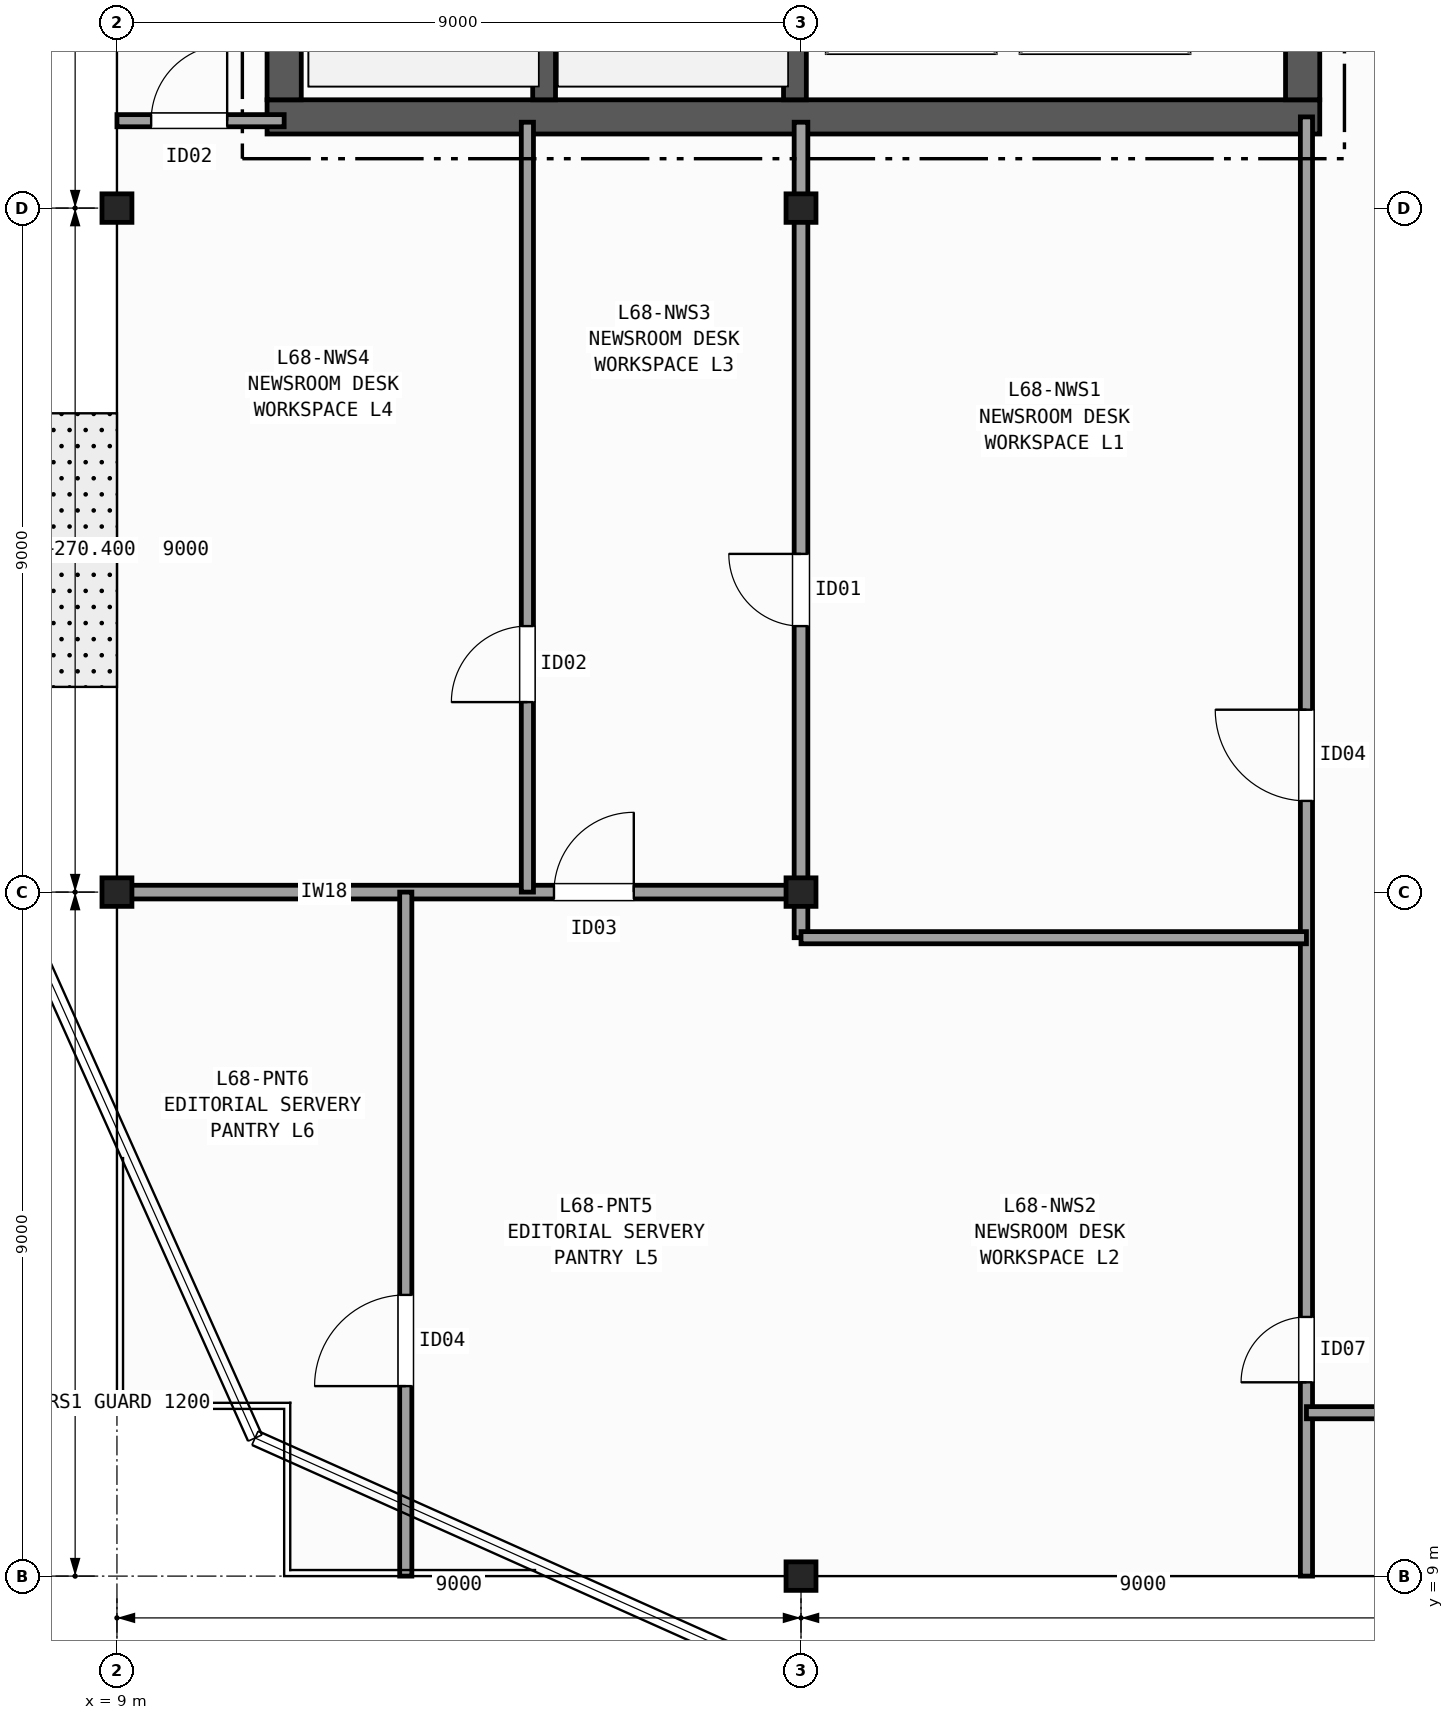
"""IFC4 building model, lengths in metres.
Left out: names, types, materials, properties, quantities, classifications, styles, units other than length and angle.
Written with IfcOpenShell. Run it as: python <this file> out.ifc"""

import sys

from ifc_helpers import new_model, si_unit, direction, frame, frame_2d, origin, origin_2d, place, context, subcontext, project, spatial, rectangle, i_section, extrude, element, fill, save


model = new_model("IFC4")
c1 = context("Model", 3, precision=1e-05, world=origin(), true_north=direction((0.0, 1.0)))
c2 = subcontext(c1, "Body", "Model", "MODEL_VIEW")
j1 = project(units=[si_unit("LENGTHUNIT", "METRE"), si_unit("PLANEANGLEUNIT", "RADIAN")], contexts=[c1])
p1 = place(None, origin())
s1 = spatial("IfcSite", under=j1, at=p1, CompositionType="ELEMENT")
p2 = place(p1, origin())
s2 = spatial("IfcBuilding", under=s1, at=p2, CompositionType="ELEMENT")
p3 = place(p2, frame((0.0, 0.0, 270.4)))
s3 = spatial("IfcBuildingStorey", under=s2, at=p3, CompositionType="ELEMENT", Elevation=270.4)
for number, where, z_axis, x_axis in (
    (1, (9.0, 18.0, 0.0), (0.0, 0.0, 1.0), (1.0, 0.0, 0.0)),
    (2, (9.0, 27.0, 0.0), (0.0, 0.0, 1.0), (1.0, 0.0, 0.0)),
    (3, (18.0, 9.0, 0.0), (0.0, 0.0, 1.0), (1.0, 0.0, 0.0)),
    (4, (18.0, 18.0, 0.0), (0.0, 0.0, 1.0), (1.0, 0.0, 0.0)),
    (5, (18.0, 27.0, 0.0), (0.0, 0.0, 1.0), (1.0, 0.0, 0.0)),
):
    element("IfcColumn", number, at=place(p3, frame(where, z_axis=z_axis, x_axis=x_axis)), inside=s3, PredefinedType="COLUMN", context=c2, shape_type="SweptSolid", body=[
        extrude(i_section(OverallWidth=0.394, OverallDepth=0.375, WebThickness=0.017, FlangeThickness=0.028, FilletRadius=0.015, at=origin_2d()), origin(), (0.0, 0.0, 1.0), 3.7),
    ])
p4 = place(p3, frame((10.975, 28.2, 0.0), z_axis=(0.0, 0.0, 1.0), x_axis=(1.0, 0.0, 0.0)))
e6 = element("IfcWall", 6, at=p4, inside=s3, PredefinedType="SHEAR", context=c2, shape_type="SweptSolid", body=[
    extrude(rectangle(XDim=13.85, YDim=0.45, at=frame_2d((6.925, 0.0))), origin(), (0.0, 0.0, 1.0), 3.42),
])
p5 = place(p3, frame((11.2, 42.175, 0.0), z_axis=(0.0, 0.0, 1.0), x_axis=(0.0, -1.0, 0.0)))
e7 = element("IfcWall", 7, at=p5, inside=s3, PredefinedType="SHEAR", context=c2, shape_type="SweptSolid", body=[
    extrude(rectangle(XDim=13.75, YDim=0.45, at=frame_2d((6.875, 0.0))), origin(), (0.0, 0.0, 1.0), 3.42),
])
p6 = place(p3, frame((24.6, 28.425, 0.0), z_axis=(0.0, 0.0, 1.0), x_axis=(0.0, 1.0, 0.0)))
e8 = element("IfcWall", 8, at=p6, inside=s3, PredefinedType="SHEAR", context=c2, shape_type="SweptSolid", body=[
    extrude(rectangle(XDim=13.75, YDim=0.45, at=frame_2d((6.875, 0.0))), origin(), (0.0, 0.0, 1.0), 3.42),
])
p7 = place(p6, frame((3.375, 0.0, 0.0)))
e9 = element("IfcOpeningElement", 9, at=p7, cuts=e8, PredefinedType="OPENING", context=c2, shape_type="SweptSolid", body=[
    extrude(rectangle(XDim=1.5, YDim=2.2, at=frame_2d((0.75, 1.1))), frame((0.0, 0.235, 0.0), z_axis=(0.0, -1.0, 0.0), x_axis=(1.0, 0.0, 0.0)), (0.0, 0.0, 1.0), 0.47),
])
p8 = place(p6, frame((9.975, 0.0, 0.0)))
e10 = element("IfcOpeningElement", 10, at=p8, cuts=e8, PredefinedType="OPENING", context=c2, shape_type="SweptSolid", body=[
    extrude(rectangle(XDim=0.9, YDim=2.1, at=frame_2d((0.45, 1.05))), frame((0.0, 0.235, 0.0), z_axis=(0.0, -1.0, 0.0), x_axis=(1.0, 0.0, 0.0)), (0.0, 0.0, 1.0), 0.47),
])
p9 = place(p3, frame((14.62, 28.425, 0.0), z_axis=(0.0, 0.0, 1.0), x_axis=(0.0, 1.0, 0.0)))
e11 = element("IfcWall", 11, at=p9, inside=s3, PredefinedType="SHEAR", context=c2, shape_type="SweptSolid", body=[
    extrude(rectangle(XDim=9.025, YDim=0.3, at=frame_2d((4.512, 0.0))), origin(), (0.0, 0.0, 1.0), 3.42),
])
p10 = place(p3, frame((17.92, 42.175, 0.0), z_axis=(0.0, 0.0, 1.0), x_axis=(0.0, -1.0, 0.0)))
e12 = element("IfcWall", 12, at=p10, inside=s3, PredefinedType="SHEAR", context=c2, shape_type="SweptSolid", body=[
    extrude(rectangle(XDim=13.75, YDim=0.3, at=frame_2d((6.875, 0.0))), origin(), (0.0, 0.0, 1.0), 3.42),
])
p11 = place(p10, frame((2.0, 0.0, 0.0)))
e13 = element("IfcOpeningElement", 13, at=p11, cuts=e12, PredefinedType="OPENING", context=c2, shape_type="SweptSolid", body=[
    extrude(rectangle(XDim=1.15, YDim=2.15, at=frame_2d((0.575, 1.075))), frame((0.0, 0.16, 0.0), z_axis=(0.0, -1.0, 0.0), x_axis=(1.0, 0.0, 0.0)), (0.0, 0.0, 1.0), 0.32),
])
p12 = place(p3, frame((9.0, 28.15, 0.0), z_axis=(0.0, 0.0, 1.0), x_axis=(1.0, 0.0, 0.0)))
e14 = element("IfcWall", 14, at=p12, inside=s3, PredefinedType="PARTITIONING", context=c2, shape_type="SweptSolid", body=[
    extrude(rectangle(XDim=2.2, YDim=0.16, at=frame_2d((1.1, 0.0))), origin(), (0.0, 0.0, 1.0), 2.707),
])
p13 = place(p12, frame((0.45, 0.0, 0.0)))
e15 = element("IfcOpeningElement", 15, at=p13, cuts=e14, PredefinedType="OPENING", context=c2, shape_type="SweptSolid", body=[
    extrude(rectangle(XDim=1.0, YDim=2.1, at=frame_2d((0.5, 1.05))), frame((0.0, 0.09, 0.0), z_axis=(0.0, -1.0, 0.0), x_axis=(1.0, 0.0, 0.0)), (0.0, 0.0, 1.0), 0.18),
])
p14 = place(p3, frame((24.65, 9.0, 0.0), z_axis=(0.0, 0.0, 1.0), x_axis=(0.0, 1.0, 0.0)))
e16 = element("IfcWall", 16, at=p14, inside=s3, PredefinedType="PARTITIONING", context=c2, shape_type="SweptSolid", body=[
    extrude(rectangle(XDim=19.2, YDim=0.16, at=frame_2d((9.6, 0.0))), origin(), (0.0, 0.0, 1.0), 2.707),
])
p15 = place(p14, frame((10.2, 0.0, 0.0)))
e17 = element("IfcOpeningElement", 17, at=p15, cuts=e16, PredefinedType="OPENING", context=c2, shape_type="SweptSolid", body=[
    extrude(rectangle(XDim=1.2, YDim=2.15, at=frame_2d((0.6, 1.075))), frame((0.0, 0.09, 0.0), z_axis=(0.0, -1.0, 0.0), x_axis=(1.0, 0.0, 0.0)), (0.0, 0.0, 1.0), 0.18),
])
p16 = place(p14, frame((2.55, 0.0, 0.0)))
e18 = element("IfcOpeningElement", 18, at=p16, cuts=e16, PredefinedType="OPENING", context=c2, shape_type="SweptSolid", body=[
    extrude(rectangle(XDim=0.86, YDim=2.05, at=frame_2d((0.43, 1.025))), frame((0.0, 0.09, 0.0), z_axis=(0.0, -1.0, 0.0), x_axis=(1.0, 0.0, 0.0)), (0.0, 0.0, 1.0), 0.18),
])
p17 = place(p3, frame((9.0, 18.0, 0.0), z_axis=(0.0, 0.0, 1.0), x_axis=(1.0, 0.0, 0.0)))
e19 = element("IfcWall", 19, at=p17, inside=s3, PredefinedType="PARTITIONING", context=c2, shape_type="SweptSolid", body=[
    extrude(rectangle(XDim=9.08, YDim=0.18, at=frame_2d((4.54, 0.0))), origin(), (0.0, 0.0, 1.0), 2.707),
])
p18 = place(p17, frame((5.75, 0.0, 0.0)))
e20 = element("IfcOpeningElement", 20, at=p18, cuts=e19, PredefinedType="OPENING", context=c2, shape_type="SweptSolid", body=[
    extrude(rectangle(XDim=1.05, YDim=2.15, at=frame_2d((0.525, 1.075))), frame((0.0, 0.1, 0.0), z_axis=(0.0, -1.0, 0.0), x_axis=(1.0, 0.0, 0.0)), (0.0, 0.0, 1.0), 0.2),
])
p19 = place(p3, frame((18.0, 17.4, 0.0), z_axis=(0.0, 0.0, 1.0), x_axis=(0.0, 1.0, 0.0)))
e21 = element("IfcWall", 21, at=p19, inside=s3, PredefinedType="PARTITIONING", context=c2, shape_type="SweptSolid", body=[
    extrude(rectangle(XDim=10.73, YDim=0.18, at=frame_2d((5.365, 0.0))), origin(), (0.0, 0.0, 1.0), 2.789),
])
p20 = place(p19, frame((4.1, 0.0, 0.0)))
e22 = element("IfcOpeningElement", 22, at=p20, cuts=e21, PredefinedType="OPENING", context=c2, shape_type="SweptSolid", body=[
    extrude(rectangle(XDim=0.95, YDim=2.1, at=frame_2d((0.475, 1.05))), frame((0.0, 0.1, 0.0), z_axis=(0.0, -1.0, 0.0), x_axis=(1.0, 0.0, 0.0)), (0.0, 0.0, 1.0), 0.2),
])
p21 = place(p3, frame((18.0, 17.4, 0.0), z_axis=(0.0, 0.0, 1.0), x_axis=(1.0, 0.0, 0.0)))
e23 = element("IfcWall", 23, at=p21, inside=s3, PredefinedType="PARTITIONING", context=c2, shape_type="SweptSolid", body=[
    extrude(rectangle(XDim=6.65, YDim=0.16, at=frame_2d((3.325, 0.0))), origin(), (0.0, 0.0, 1.0), 2.789),
])
p22 = place(p3, frame((14.4, 18.0, 0.0), z_axis=(0.0, 0.0, 1.0), x_axis=(0.0, 1.0, 0.0)))
e24 = element("IfcWall", 24, at=p22, inside=s3, PredefinedType="PARTITIONING", context=c2, shape_type="SweptSolid", body=[
    extrude(rectangle(XDim=10.13, YDim=0.16, at=frame_2d((5.065, 0.0))), origin(), (0.0, 0.0, 1.0), 2.789),
])
p23 = place(p22, frame((2.5, 0.0, 0.0)))
e25 = element("IfcOpeningElement", 25, at=p23, cuts=e24, PredefinedType="OPENING", context=c2, shape_type="SweptSolid", body=[
    extrude(rectangle(XDim=1.0, YDim=2.1, at=frame_2d((0.5, 1.05))), frame((0.0, 0.09, 0.0), z_axis=(0.0, -1.0, 0.0), x_axis=(1.0, 0.0, 0.0)), (0.0, 0.0, 1.0), 0.18),
])
p24 = place(p3, frame((12.8, 9.0, 0.0), z_axis=(0.0, 0.0, 1.0), x_axis=(0.0, 1.0, 0.0)))
e26 = element("IfcWall", 26, at=p24, inside=s3, PredefinedType="PARTITIONING", context=c2, shape_type="SweptSolid", body=[
    extrude(rectangle(XDim=9.0, YDim=0.16, at=frame_2d((4.5, 0.0))), origin(), (0.0, 0.0, 1.0), 2.789),
])
p25 = place(p24, frame((2.5, 0.0, 0.0)))
e27 = element("IfcOpeningElement", 27, at=p25, cuts=e26, PredefinedType="OPENING", context=c2, shape_type="SweptSolid", body=[
    extrude(rectangle(XDim=1.2, YDim=2.15, at=frame_2d((0.6, 1.075))), frame((0.0, 0.09, 0.0), z_axis=(0.0, -1.0, 0.0), x_axis=(1.0, 0.0, 0.0)), (0.0, 0.0, 1.0), 0.18),
])
p26 = place(p3, frame((24.65, 11.15, 0.0), z_axis=(0.0, 0.0, 1.0), x_axis=(1.0, 0.0, 0.0)))
e28 = element("IfcWall", 28, at=p26, inside=s3, PredefinedType="PARTITIONING", context=c2, shape_type="SweptSolid", body=[
    extrude(rectangle(XDim=4.75, YDim=0.16, at=frame_2d((2.375, 0.0))), origin(), (0.0, 0.0, 1.0), 2.792),
])
p27 = place(p26, frame((1.2, 0.0, 0.0)))
e29 = element("IfcOpeningElement", 29, at=p27, cuts=e28, PredefinedType="OPENING", context=c2, shape_type="SweptSolid", body=[
    extrude(rectangle(XDim=0.86, YDim=2.05, at=frame_2d((0.43, 1.025))), frame((0.0, 0.09, 0.0), z_axis=(0.0, -1.0, 0.0), x_axis=(1.0, 0.0, 0.0)), (0.0, 0.0, 1.0), 0.18),
])
p28 = place(p13, origin())
e30 = element("IfcDoor", 30, at=p28, inside=s3, OperationType="SINGLE_SWING_RIGHT", PredefinedType="DOOR", context=c2, shape_type="SweptSolid", body=[
    extrude(rectangle(XDim=1.0, YDim=2.1, at=frame_2d((0.5, 1.05))), frame((0.0, 0.025, 0.0), z_axis=(0.0, -1.0, 0.0), x_axis=(1.0, 0.0, 0.0)), (0.0, 0.0, 1.0), 0.05),
])
fill(e15, e30)
p29 = place(p15, origin())
e31 = element("IfcDoor", 31, at=p29, inside=s3, OperationType="SINGLE_SWING_RIGHT", PredefinedType="DOOR", context=c2, shape_type="SweptSolid", body=[
    extrude(rectangle(XDim=1.2, YDim=2.15, at=frame_2d((0.6, 1.075))), frame((0.0, 0.025, 0.0), z_axis=(0.0, -1.0, 0.0), x_axis=(1.0, 0.0, 0.0)), (0.0, 0.0, 1.0), 0.05),
])
fill(e17, e31)
p30 = place(p16, origin())
e32 = element("IfcDoor", 32, at=p30, inside=s3, OperationType="SINGLE_SWING_LEFT", PredefinedType="DOOR", context=c2, shape_type="SweptSolid", body=[
    extrude(rectangle(XDim=0.86, YDim=2.05, at=frame_2d((0.43, 1.025))), frame((0.0, 0.025, 0.0), z_axis=(0.0, -1.0, 0.0), x_axis=(1.0, 0.0, 0.0)), (0.0, 0.0, 1.0), 0.05),
])
fill(e18, e32)
p31 = place(p20, origin())
e33 = element("IfcDoor", 33, at=p31, inside=s3, OperationType="SINGLE_SWING_RIGHT", PredefinedType="DOOR", context=c2, shape_type="SweptSolid", body=[
    extrude(rectangle(XDim=0.95, YDim=2.1, at=frame_2d((0.475, 1.05))), frame((0.0, 0.025, 0.0), z_axis=(0.0, -1.0, 0.0), x_axis=(1.0, 0.0, 0.0)), (0.0, 0.0, 1.0), 0.05),
])
fill(e22, e33)
p32 = place(p23, origin())
e34 = element("IfcDoor", 34, at=p32, inside=s3, OperationType="SINGLE_SWING_LEFT", PredefinedType="DOOR", context=c2, shape_type="SweptSolid", body=[
    extrude(rectangle(XDim=1.0, YDim=2.1, at=frame_2d((0.5, 1.05))), frame((0.0, 0.025, 0.0), z_axis=(0.0, -1.0, 0.0), x_axis=(1.0, 0.0, 0.0)), (0.0, 0.0, 1.0), 0.05),
])
fill(e25, e34)
p33 = place(p18, origin())
e35 = element("IfcDoor", 35, at=p33, inside=s3, OperationType="SINGLE_SWING_RIGHT", PredefinedType="DOOR", context=c2, shape_type="SweptSolid", body=[
    extrude(rectangle(XDim=1.05, YDim=2.15, at=frame_2d((0.525, 1.075))), frame((0.0, 0.025, 0.0), z_axis=(0.0, -1.0, 0.0), x_axis=(1.0, 0.0, 0.0)), (0.0, 0.0, 1.0), 0.05),
])
fill(e20, e35)
p34 = place(p25, origin())
e36 = element("IfcDoor", 36, at=p34, inside=s3, OperationType="SINGLE_SWING_LEFT", PredefinedType="DOOR", context=c2, shape_type="SweptSolid", body=[
    extrude(rectangle(XDim=1.2, YDim=2.15, at=frame_2d((0.6, 1.075))), frame((0.0, 0.025, 0.0), z_axis=(0.0, -1.0, 0.0), x_axis=(1.0, 0.0, 0.0)), (0.0, 0.0, 1.0), 0.05),
])
fill(e27, e36)
save(model, sys.argv[1])
